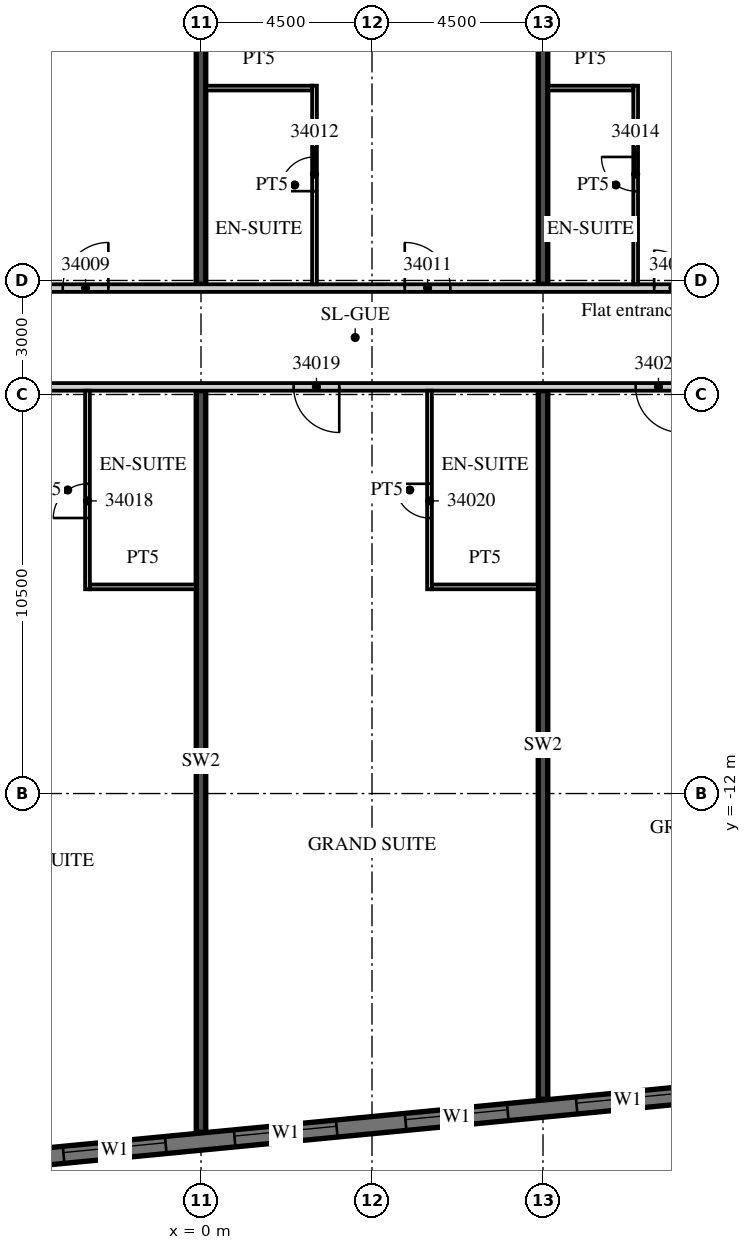
"""IFC4 building model, lengths in metres.
Left out: names, types, materials, properties, quantities, classifications, styles, units other than length and angle.
Written with IfcOpenShell. Run it as: python <this file> out.ifc"""

import sys

from ifc_helpers import new_model, si_unit, direction, frame, frame_2d, origin, place, context, subcontext, project, spatial, rectangle, extrude, element, fill, save


model = new_model("IFC4")
c1 = context("Model", 3, precision=1e-05, world=origin(), true_north=direction((0.0, 1.0)))
c2 = subcontext(c1, "Body", "Model", "MODEL_VIEW")
j1 = project(units=[si_unit("LENGTHUNIT", "METRE"), si_unit("PLANEANGLEUNIT", "RADIAN")], contexts=[c1])
p1 = place(None, origin())
s1 = spatial("IfcSite", under=j1, at=p1, CompositionType="ELEMENT")
p2 = place(p1, origin())
s2 = spatial("IfcBuilding", under=s1, at=p2, CompositionType="ELEMENT")
p3 = place(p2, frame((0.0, 0.0, 147.1)))
s3 = spatial("IfcBuildingStorey", under=s2, at=p3, CompositionType="ELEMENT", Elevation=147.1)
p4 = place(p3, frame((0.0, -20.91, 0.0), z_axis=(0.0, 0.0, 1.0), x_axis=(0.0, 1.0, 0.0)))
e1 = element("IfcWall", 1, at=p4, inside=s3, PredefinedType="SHEAR", context=c2, shape_type="SweptSolid", body=[
    extrude(rectangle(XDim=19.51, YDim=0.25, at=frame_2d((9.755, 0.0))), origin(), (0.0, 0.0, 1.0), 3.0),
])
p5 = place(p3, frame((0.0, 1.4, 0.0), z_axis=(0.0, 0.0, 1.0), x_axis=(0.0, 1.0, 0.0)))
e2 = element("IfcWall", 2, at=p5, inside=s3, PredefinedType="SHEAR", context=c2, shape_type="SweptSolid", body=[
    extrude(rectangle(XDim=19.94, YDim=0.25, at=frame_2d((9.97, 0.0))), origin(), (0.0, 0.0, 1.0), 3.0),
])
p6 = place(p3, frame((9.0, -20.044, 0.0), z_axis=(0.0, 0.0, 1.0), x_axis=(0.0, 1.0, 0.0)))
e3 = element("IfcWall", 3, at=p6, inside=s3, PredefinedType="SHEAR", context=c2, shape_type="SweptSolid", body=[
    extrude(rectangle(XDim=18.644, YDim=0.25, at=frame_2d((9.322, 0.0))), origin(), (0.0, 0.0, 1.0), 3.0),
])
p7 = place(p3, frame((9.0, 1.4, 0.0), z_axis=(0.0, 0.0, 1.0), x_axis=(0.0, 1.0, 0.0)))
e4 = element("IfcWall", 4, at=p7, inside=s3, PredefinedType="SHEAR", context=c2, shape_type="SweptSolid", body=[
    extrude(rectangle(XDim=20.807, YDim=0.25, at=frame_2d((10.403, 0.0))), origin(), (0.0, 0.0, 1.0), 3.0),
])
p8 = place(p3, frame((-13.521, -22.46, 0.0), z_axis=(0.0, 0.0, 1.0), x_axis=(0.995396096335, 0.095846812164, 0.0)))
e5 = element("IfcWall", 5, at=p8, inside=s3, PredefinedType="SOLIDWALL", context=c2, shape_type="SweptSolid", body=[
    extrude(rectangle(XDim=59.151, YDim=0.45, at=frame_2d((29.575, 0.0))), origin(), (0.0, 0.0, 1.0), 3.0),
])
p9 = place(p8, frame((0.91, 0.0, 0.45)))
e6 = element("IfcOpeningElement", 6, at=p9, cuts=e5, PredefinedType="OPENING", context=c2, shape_type="SweptSolid", body=[
    extrude(rectangle(XDim=2.7, YDim=2.25, at=frame_2d((1.35, 1.125))), frame((0.0, 0.235, 0.0), z_axis=(0.0, -1.0, 0.0), x_axis=(1.0, 0.0, 0.0)), (0.0, 0.0, 1.0), 0.47),
])
p10 = place(p8, frame((5.431, 0.0, 0.45)))
e7 = element("IfcOpeningElement", 7, at=p10, cuts=e5, PredefinedType="OPENING", context=c2, shape_type="SweptSolid", body=[
    extrude(rectangle(XDim=2.7, YDim=2.25, at=frame_2d((1.35, 1.125))), frame((0.0, 0.235, 0.0), z_axis=(0.0, -1.0, 0.0), x_axis=(1.0, 0.0, 0.0)), (0.0, 0.0, 1.0), 0.47),
])
p11 = place(p8, frame((9.952, 0.0, 0.45)))
e8 = element("IfcOpeningElement", 8, at=p11, cuts=e5, PredefinedType="OPENING", context=c2, shape_type="SweptSolid", body=[
    extrude(rectangle(XDim=2.7, YDim=2.25, at=frame_2d((1.35, 1.125))), frame((0.0, 0.235, 0.0), z_axis=(0.0, -1.0, 0.0), x_axis=(1.0, 0.0, 0.0)), (0.0, 0.0, 1.0), 0.47),
])
p12 = place(p8, frame((14.473, 0.0, 0.45)))
e9 = element("IfcOpeningElement", 9, at=p12, cuts=e5, PredefinedType="OPENING", context=c2, shape_type="SweptSolid", body=[
    extrude(rectangle(XDim=2.7, YDim=2.25, at=frame_2d((1.35, 1.125))), frame((0.0, 0.235, 0.0), z_axis=(0.0, -1.0, 0.0), x_axis=(1.0, 0.0, 0.0)), (0.0, 0.0, 1.0), 0.47),
])
p13 = place(p8, frame((18.994, 0.0, 0.45)))
e10 = element("IfcOpeningElement", 10, at=p13, cuts=e5, PredefinedType="OPENING", context=c2, shape_type="SweptSolid", body=[
    extrude(rectangle(XDim=2.7, YDim=2.25, at=frame_2d((1.35, 1.125))), frame((0.0, 0.235, 0.0), z_axis=(0.0, -1.0, 0.0), x_axis=(1.0, 0.0, 0.0)), (0.0, 0.0, 1.0), 0.47),
])
p14 = place(p8, frame((23.514, 0.0, 0.45)))
e11 = element("IfcOpeningElement", 11, at=p14, cuts=e5, PredefinedType="OPENING", context=c2, shape_type="SweptSolid", body=[
    extrude(rectangle(XDim=2.7, YDim=2.25, at=frame_2d((1.35, 1.125))), frame((0.0, 0.235, 0.0), z_axis=(0.0, -1.0, 0.0), x_axis=(1.0, 0.0, 0.0)), (0.0, 0.0, 1.0), 0.47),
])
p15 = place(p8, frame((28.035, 0.0, 0.45)))
e12 = element("IfcOpeningElement", 12, at=p15, cuts=e5, PredefinedType="OPENING", context=c2, shape_type="SweptSolid", body=[
    extrude(rectangle(XDim=2.7, YDim=2.25, at=frame_2d((1.35, 1.125))), frame((0.0, 0.235, 0.0), z_axis=(0.0, -1.0, 0.0), x_axis=(1.0, 0.0, 0.0)), (0.0, 0.0, 1.0), 0.47),
])
p16 = place(p8, frame((32.556, 0.0, 0.45)))
e13 = element("IfcOpeningElement", 13, at=p16, cuts=e5, PredefinedType="OPENING", context=c2, shape_type="SweptSolid", body=[
    extrude(rectangle(XDim=2.7, YDim=2.25, at=frame_2d((1.35, 1.125))), frame((0.0, 0.235, 0.0), z_axis=(0.0, -1.0, 0.0), x_axis=(1.0, 0.0, 0.0)), (0.0, 0.0, 1.0), 0.47),
])
p17 = place(p8, frame((37.077, 0.0, 0.45)))
e14 = element("IfcOpeningElement", 14, at=p17, cuts=e5, PredefinedType="OPENING", context=c2, shape_type="SweptSolid", body=[
    extrude(rectangle(XDim=2.7, YDim=2.25, at=frame_2d((1.35, 1.125))), frame((0.0, 0.235, 0.0), z_axis=(0.0, -1.0, 0.0), x_axis=(1.0, 0.0, 0.0)), (0.0, 0.0, 1.0), 0.47),
])
p18 = place(p8, frame((41.598, 0.0, 0.45)))
e15 = element("IfcOpeningElement", 15, at=p18, cuts=e5, PredefinedType="OPENING", context=c2, shape_type="SweptSolid", body=[
    extrude(rectangle(XDim=2.7, YDim=2.25, at=frame_2d((1.35, 1.125))), frame((0.0, 0.235, 0.0), z_axis=(0.0, -1.0, 0.0), x_axis=(1.0, 0.0, 0.0)), (0.0, 0.0, 1.0), 0.47),
])
p19 = place(p8, frame((46.118, 0.0, 0.45)))
e16 = element("IfcOpeningElement", 16, at=p19, cuts=e5, PredefinedType="OPENING", context=c2, shape_type="SweptSolid", body=[
    extrude(rectangle(XDim=2.7, YDim=2.25, at=frame_2d((1.35, 1.125))), frame((0.0, 0.235, 0.0), z_axis=(0.0, -1.0, 0.0), x_axis=(1.0, 0.0, 0.0)), (0.0, 0.0, 1.0), 0.47),
])
p20 = place(p8, frame((50.639, 0.0, 0.45)))
e17 = element("IfcOpeningElement", 17, at=p20, cuts=e5, PredefinedType="OPENING", context=c2, shape_type="SweptSolid", body=[
    extrude(rectangle(XDim=2.7, YDim=2.25, at=frame_2d((1.35, 1.125))), frame((0.0, 0.235, 0.0), z_axis=(0.0, -1.0, 0.0), x_axis=(1.0, 0.0, 0.0)), (0.0, 0.0, 1.0), 0.47),
])
p21 = place(p8, frame((55.15, 0.0, 0.45)))
e18 = element("IfcOpeningElement", 18, at=p21, cuts=e5, PredefinedType="OPENING", context=c2, shape_type="SweptSolid", body=[
    extrude(rectangle(XDim=2.7, YDim=2.25, at=frame_2d((1.35, 1.125))), frame((0.0, 0.235, 0.0), z_axis=(0.0, -1.0, 0.0), x_axis=(1.0, 0.0, 0.0)), (0.0, 0.0, 1.0), 0.47),
])
p22 = place(p3, frame((-39.316, 1.3, 0.0), z_axis=(0.0, 0.0, 1.0), x_axis=(1.0, 0.0, 0.0)))
e19 = element("IfcWall", 19, at=p22, inside=s3, PredefinedType="PARTITIONING", context=c2, shape_type="SweptSolid", body=[
    extrude(rectangle(XDim=52.816, YDim=0.2, at=frame_2d((26.408, 0.0))), origin(), (0.0, 0.0, 1.0), 3.0),
])
p23 = place(p22, frame((0.15, 0.0, 0.0)))
e20 = element("IfcOpeningElement", 20, at=p23, cuts=e19, PredefinedType="OPENING", context=c2, shape_type="SweptSolid", body=[
    extrude(rectangle(XDim=0.9, YDim=2.1, at=frame_2d((0.45, 1.05))), frame((0.0, 0.11, 0.0), z_axis=(0.0, -1.0, 0.0), x_axis=(1.0, 0.0, 0.0)), (0.0, 0.0, 1.0), 0.22),
])
p24 = place(p22, frame((5.754, 0.0, 0.0)))
e21 = element("IfcOpeningElement", 21, at=p24, cuts=e19, PredefinedType="OPENING", context=c2, shape_type="SweptSolid", body=[
    extrude(rectangle(XDim=1.2, YDim=2.1, at=frame_2d((0.6, 1.05))), frame((0.0, 0.11, 0.0), z_axis=(0.0, -1.0, 0.0), x_axis=(1.0, 0.0, 0.0)), (0.0, 0.0, 1.0), 0.22),
])
p25 = place(p22, frame((14.754, 0.0, 0.0)))
e22 = element("IfcOpeningElement", 22, at=p25, cuts=e19, PredefinedType="OPENING", context=c2, shape_type="SweptSolid", body=[
    extrude(rectangle(XDim=1.2, YDim=2.1, at=frame_2d((0.6, 1.05))), frame((0.0, 0.11, 0.0), z_axis=(0.0, -1.0, 0.0), x_axis=(1.0, 0.0, 0.0)), (0.0, 0.0, 1.0), 0.22),
])
p26 = place(p22, frame((23.754, 0.0, 0.0)))
e23 = element("IfcOpeningElement", 23, at=p26, cuts=e19, PredefinedType="OPENING", context=c2, shape_type="SweptSolid", body=[
    extrude(rectangle(XDim=1.2, YDim=2.1, at=frame_2d((0.6, 1.05))), frame((0.0, 0.11, 0.0), z_axis=(0.0, -1.0, 0.0), x_axis=(1.0, 0.0, 0.0)), (0.0, 0.0, 1.0), 0.22),
])
p27 = place(p22, frame((35.678, 0.0, 0.0)))
e24 = element("IfcOpeningElement", 24, at=p27, cuts=e19, PredefinedType="OPENING", context=c2, shape_type="SweptSolid", body=[
    extrude(rectangle(XDim=1.2, YDim=2.1, at=frame_2d((0.6, 1.05))), frame((0.0, 0.11, 0.0), z_axis=(0.0, -1.0, 0.0), x_axis=(1.0, 0.0, 0.0)), (0.0, 0.0, 1.0), 0.22),
])
p28 = place(p22, frame((44.678, 0.0, 0.0)))
e25 = element("IfcOpeningElement", 25, at=p28, cuts=e19, PredefinedType="OPENING", context=c2, shape_type="SweptSolid", body=[
    extrude(rectangle(XDim=1.2, YDim=2.1, at=frame_2d((0.6, 1.05))), frame((0.0, 0.11, 0.0), z_axis=(0.0, -1.0, 0.0), x_axis=(1.0, 0.0, 0.0)), (0.0, 0.0, 1.0), 0.22),
])
p29 = place(p22, frame((51.241, 0.0, 0.0)))
e26 = element("IfcOpeningElement", 26, at=p29, cuts=e19, PredefinedType="OPENING", context=c2, shape_type="SweptSolid", body=[
    extrude(rectangle(XDim=1.0, YDim=2.1, at=frame_2d((0.5, 1.05))), frame((0.0, 0.11, 0.0), z_axis=(0.0, -1.0, 0.0), x_axis=(1.0, 0.0, 0.0)), (0.0, 0.0, 1.0), 0.22),
])
p30 = place(p3, frame((2.987, 1.4, 0.0), z_axis=(0.0, 0.0, 1.0), x_axis=(0.0, 1.0, 0.0)))
e27 = element("IfcWall", 27, at=p30, inside=s3, PredefinedType="PARTITIONING", context=c2, shape_type="SweptSolid", body=[
    extrude(rectangle(XDim=5.225, YDim=0.125, at=frame_2d((2.613, 0.0))), origin(), (0.0, 0.0, 1.0), 3.0),
])
p31 = place(p30, frame((2.45, 0.0, 0.0)))
e28 = element("IfcOpeningElement", 28, at=p31, cuts=e27, PredefinedType="OPENING", context=c2, shape_type="SweptSolid", body=[
    extrude(rectangle(XDim=0.9, YDim=2.1, at=frame_2d((0.45, 1.05))), frame((0.0, 0.073, 0.0), z_axis=(0.0, -1.0, 0.0), x_axis=(1.0, 0.0, 0.0)), (0.0, 0.0, 1.0), 0.145),
])
p32 = place(p3, frame((0.125, 6.562, 0.0), z_axis=(0.0, 0.0, 1.0), x_axis=(1.0, 0.0, 0.0)))
e29 = element("IfcWall", 29, at=p32, inside=s3, PredefinedType="PARTITIONING", context=c2, shape_type="SweptSolid", body=[
    extrude(rectangle(XDim=2.8, YDim=0.125, at=frame_2d((1.4, 0.0))), origin(), (0.0, 0.0, 1.0), 3.0),
])
p33 = place(p3, frame((11.438, 1.4, 0.0), z_axis=(0.0, 0.0, 1.0), x_axis=(0.0, 1.0, 0.0)))
e30 = element("IfcWall", 30, at=p33, inside=s3, PredefinedType="PARTITIONING", context=c2, shape_type="SweptSolid", body=[
    extrude(rectangle(XDim=5.225, YDim=0.125, at=frame_2d((2.613, 0.0))), origin(), (0.0, 0.0, 1.0), 3.0),
])
p34 = place(p33, frame((2.45, 0.0, 0.0)))
e31 = element("IfcOpeningElement", 31, at=p34, cuts=e30, PredefinedType="OPENING", context=c2, shape_type="SweptSolid", body=[
    extrude(rectangle(XDim=0.9, YDim=2.1, at=frame_2d((0.45, 1.05))), frame((0.0, 0.073, 0.0), z_axis=(0.0, -1.0, 0.0), x_axis=(1.0, 0.0, 0.0)), (0.0, 0.0, 1.0), 0.145),
])
p35 = place(p3, frame((9.125, 6.562, 0.0), z_axis=(0.0, 0.0, 1.0), x_axis=(1.0, 0.0, 0.0)))
e32 = element("IfcWall", 32, at=p35, inside=s3, PredefinedType="PARTITIONING", context=c2, shape_type="SweptSolid", body=[
    extrude(rectangle(XDim=2.25, YDim=0.125, at=frame_2d((1.125, 0.0))), origin(), (0.0, 0.0, 1.0), 3.0),
])
p36 = place(p3, frame((-13.5, -1.3, 0.0), z_axis=(0.0, 0.0, 1.0), x_axis=(1.0, 0.0, 0.0)))
e33 = element("IfcWall", 33, at=p36, inside=s3, PredefinedType="PARTITIONING", context=c2, shape_type="SweptSolid", body=[
    extrude(rectangle(XDim=60.932, YDim=0.2, at=frame_2d((30.466, 0.0))), origin(), (0.0, 0.0, 1.0), 3.0),
])
p37 = place(p36, frame((2.925, 0.0, 0.0)))
e34 = element("IfcOpeningElement", 34, at=p37, cuts=e33, PredefinedType="OPENING", context=c2, shape_type="SweptSolid", body=[
    extrude(rectangle(XDim=1.0, YDim=2.1, at=frame_2d((0.5, 1.05))), frame((0.0, 0.11, 0.0), z_axis=(0.0, -1.0, 0.0), x_axis=(1.0, 0.0, 0.0)), (0.0, 0.0, 1.0), 0.22),
])
p38 = place(p36, frame((6.938, 0.0, 0.0)))
e35 = element("IfcOpeningElement", 35, at=p38, cuts=e33, PredefinedType="OPENING", context=c2, shape_type="SweptSolid", body=[
    extrude(rectangle(XDim=1.2, YDim=2.1, at=frame_2d((0.6, 1.05))), frame((0.0, 0.11, 0.0), z_axis=(0.0, -1.0, 0.0), x_axis=(1.0, 0.0, 0.0)), (0.0, 0.0, 1.0), 0.22),
])
p39 = place(p36, frame((15.938, 0.0, 0.0)))
e36 = element("IfcOpeningElement", 36, at=p39, cuts=e33, PredefinedType="OPENING", context=c2, shape_type="SweptSolid", body=[
    extrude(rectangle(XDim=1.2, YDim=2.1, at=frame_2d((0.6, 1.05))), frame((0.0, 0.11, 0.0), z_axis=(0.0, -1.0, 0.0), x_axis=(1.0, 0.0, 0.0)), (0.0, 0.0, 1.0), 0.22),
])
p40 = place(p36, frame((24.938, 0.0, 0.0)))
e37 = element("IfcOpeningElement", 37, at=p40, cuts=e33, PredefinedType="OPENING", context=c2, shape_type="SweptSolid", body=[
    extrude(rectangle(XDim=1.2, YDim=2.1, at=frame_2d((0.6, 1.05))), frame((0.0, 0.11, 0.0), z_axis=(0.0, -1.0, 0.0), x_axis=(1.0, 0.0, 0.0)), (0.0, 0.0, 1.0), 0.22),
])
p41 = place(p36, frame((32.075, 0.0, 0.0)))
e38 = element("IfcOpeningElement", 38, at=p41, cuts=e33, PredefinedType="OPENING", context=c2, shape_type="SweptSolid", body=[
    extrude(rectangle(XDim=1.0, YDim=2.1, at=frame_2d((0.5, 1.05))), frame((0.0, 0.11, 0.0), z_axis=(0.0, -1.0, 0.0), x_axis=(1.0, 0.0, 0.0)), (0.0, 0.0, 1.0), 0.22),
])
p42 = place(p36, frame((36.55, 0.0, 0.0)))
e39 = element("IfcOpeningElement", 39, at=p42, cuts=e33, PredefinedType="OPENING", context=c2, shape_type="SweptSolid", body=[
    extrude(rectangle(XDim=1.0, YDim=2.1, at=frame_2d((0.5, 1.05))), frame((0.0, 0.11, 0.0), z_axis=(0.0, -1.0, 0.0), x_axis=(1.0, 0.0, 0.0)), (0.0, 0.0, 1.0), 0.22),
])
p43 = place(p36, frame((42.938, 0.0, 0.0)))
e40 = element("IfcOpeningElement", 40, at=p43, cuts=e33, PredefinedType="OPENING", context=c2, shape_type="SweptSolid", body=[
    extrude(rectangle(XDim=1.2, YDim=2.1, at=frame_2d((0.6, 1.05))), frame((0.0, 0.11, 0.0), z_axis=(0.0, -1.0, 0.0), x_axis=(1.0, 0.0, 0.0)), (0.0, 0.0, 1.0), 0.22),
])
p44 = place(p36, frame((52.425, 0.0, 0.0)))
e41 = element("IfcOpeningElement", 41, at=p44, cuts=e33, PredefinedType="OPENING", context=c2, shape_type="SweptSolid", body=[
    extrude(rectangle(XDim=1.0, YDim=2.1, at=frame_2d((0.5, 1.05))), frame((0.0, 0.11, 0.0), z_axis=(0.0, -1.0, 0.0), x_axis=(1.0, 0.0, 0.0)), (0.0, 0.0, 1.0), 0.22),
])
p45 = place(p36, frame((58.316, 0.0, 0.0)))
e42 = element("IfcOpeningElement", 42, at=p45, cuts=e33, PredefinedType="OPENING", context=c2, shape_type="SweptSolid", body=[
    extrude(rectangle(XDim=1.2, YDim=2.1, at=frame_2d((0.6, 1.05))), frame((0.0, 0.11, 0.0), z_axis=(0.0, -1.0, 0.0), x_axis=(1.0, 0.0, 0.0)), (0.0, 0.0, 1.0), 0.22),
])
p46 = place(p3, frame((-2.987, -6.625, 0.0), z_axis=(0.0, 0.0, 1.0), x_axis=(0.0, 1.0, 0.0)))
e43 = element("IfcWall", 43, at=p46, inside=s3, PredefinedType="PARTITIONING", context=c2, shape_type="SweptSolid", body=[
    extrude(rectangle(XDim=5.225, YDim=0.125, at=frame_2d((2.613, 0.0))), origin(), (0.0, 0.0, 1.0), 3.0),
])
p47 = place(p46, frame((1.875, 0.0, 0.0)))
e44 = element("IfcOpeningElement", 44, at=p47, cuts=e43, PredefinedType="OPENING", context=c2, shape_type="SweptSolid", body=[
    extrude(rectangle(XDim=0.9, YDim=2.1, at=frame_2d((0.45, 1.05))), frame((0.0, 0.073, 0.0), z_axis=(0.0, -1.0, 0.0), x_axis=(1.0, 0.0, 0.0)), (0.0, 0.0, 1.0), 0.145),
])
p48 = place(p3, frame((-2.925, -6.562, 0.0), z_axis=(0.0, 0.0, 1.0), x_axis=(1.0, 0.0, 0.0)))
e45 = element("IfcWall", 45, at=p48, inside=s3, PredefinedType="PARTITIONING", context=c2, shape_type="SweptSolid", body=[
    extrude(rectangle(XDim=2.8, YDim=0.125, at=frame_2d((1.4, 0.0))), origin(), (0.0, 0.0, 1.0), 3.0),
])
p49 = place(p3, frame((6.013, -6.625, 0.0), z_axis=(0.0, 0.0, 1.0), x_axis=(0.0, 1.0, 0.0)))
e46 = element("IfcWall", 46, at=p49, inside=s3, PredefinedType="PARTITIONING", context=c2, shape_type="SweptSolid", body=[
    extrude(rectangle(XDim=5.225, YDim=0.125, at=frame_2d((2.613, 0.0))), origin(), (0.0, 0.0, 1.0), 3.0),
])
p50 = place(p49, frame((1.875, 0.0, 0.0)))
e47 = element("IfcOpeningElement", 47, at=p50, cuts=e46, PredefinedType="OPENING", context=c2, shape_type="SweptSolid", body=[
    extrude(rectangle(XDim=0.9, YDim=2.1, at=frame_2d((0.45, 1.05))), frame((0.0, 0.073, 0.0), z_axis=(0.0, -1.0, 0.0), x_axis=(1.0, 0.0, 0.0)), (0.0, 0.0, 1.0), 0.145),
])
p51 = place(p3, frame((6.075, -6.562, 0.0), z_axis=(0.0, 0.0, 1.0), x_axis=(1.0, 0.0, 0.0)))
e48 = element("IfcWall", 48, at=p51, inside=s3, PredefinedType="PARTITIONING", context=c2, shape_type="SweptSolid", body=[
    extrude(rectangle(XDim=2.8, YDim=0.125, at=frame_2d((1.4, 0.0))), origin(), (0.0, 0.0, 1.0), 3.0),
])
p52 = place(p11, origin())
e49 = element("IfcWindow", 49, at=p52, inside=s3, PartitioningType="SINGLE_PANEL", PredefinedType="WINDOW", context=c2, shape_type="SweptSolid", body=[
    extrude(rectangle(XDim=2.7, YDim=2.25, at=frame_2d((1.35, 1.125))), frame((0.0, 0.09, 0.0), z_axis=(0.0, -1.0, 0.0), x_axis=(1.0, 0.0, 0.0)), (0.0, 0.0, 1.0), 0.06),
])
fill(e8, e49)
p53 = place(p12, origin())
e50 = element("IfcWindow", 50, at=p53, inside=s3, PartitioningType="SINGLE_PANEL", PredefinedType="WINDOW", context=c2, shape_type="SweptSolid", body=[
    extrude(rectangle(XDim=2.7, YDim=2.25, at=frame_2d((1.35, 1.125))), frame((0.0, 0.09, 0.0), z_axis=(0.0, -1.0, 0.0), x_axis=(1.0, 0.0, 0.0)), (0.0, 0.0, 1.0), 0.06),
])
fill(e9, e50)
p54 = place(p13, origin())
e51 = element("IfcWindow", 51, at=p54, inside=s3, PartitioningType="SINGLE_PANEL", PredefinedType="WINDOW", context=c2, shape_type="SweptSolid", body=[
    extrude(rectangle(XDim=2.7, YDim=2.25, at=frame_2d((1.35, 1.125))), frame((0.0, 0.09, 0.0), z_axis=(0.0, -1.0, 0.0), x_axis=(1.0, 0.0, 0.0)), (0.0, 0.0, 1.0), 0.06),
])
fill(e10, e51)
p55 = place(p14, origin())
e52 = element("IfcWindow", 52, at=p55, inside=s3, PartitioningType="SINGLE_PANEL", PredefinedType="WINDOW", context=c2, shape_type="SweptSolid", body=[
    extrude(rectangle(XDim=2.7, YDim=2.25, at=frame_2d((1.35, 1.125))), frame((0.0, 0.09, 0.0), z_axis=(0.0, -1.0, 0.0), x_axis=(1.0, 0.0, 0.0)), (0.0, 0.0, 1.0), 0.06),
])
fill(e11, e52)
p56 = place(p27, origin())
e53 = element("IfcDoor", 53, at=p56, inside=s3, OperationType="SINGLE_SWING_RIGHT", PredefinedType="DOOR", context=c2, shape_type="SweptSolid", body=[
    extrude(rectangle(XDim=1.2, YDim=2.1, at=frame_2d((0.6, 1.05))), frame((0.0, 0.025, 0.0), z_axis=(0.0, -1.0, 0.0), x_axis=(1.0, 0.0, 0.0)), (0.0, 0.0, 1.0), 0.05),
])
fill(e24, e53)
p57 = place(p28, origin())
e54 = element("IfcDoor", 54, at=p57, inside=s3, OperationType="SINGLE_SWING_LEFT", PredefinedType="DOOR", context=c2, shape_type="SweptSolid", body=[
    extrude(rectangle(XDim=1.2, YDim=2.1, at=frame_2d((0.6, 1.05))), frame((0.0, 0.025, 0.0), z_axis=(0.0, -1.0, 0.0), x_axis=(1.0, 0.0, 0.0)), (0.0, 0.0, 1.0), 0.05),
])
fill(e25, e54)
p58 = place(p31, origin())
e55 = element("IfcDoor", 55, at=p58, inside=s3, OperationType="SINGLE_SWING_LEFT", PredefinedType="DOOR", context=c2, shape_type="SweptSolid", body=[
    extrude(rectangle(XDim=0.9, YDim=2.1, at=frame_2d((0.45, 1.05))), frame((0.0, 0.025, 0.0), z_axis=(0.0, -1.0, 0.0), x_axis=(1.0, 0.0, 0.0)), (0.0, 0.0, 1.0), 0.05),
])
fill(e28, e55)
p59 = place(p29, origin())
e56 = element("IfcDoor", 56, at=p59, inside=s3, OperationType="SINGLE_SWING_LEFT", PredefinedType="DOOR", context=c2, shape_type="SweptSolid", body=[
    extrude(rectangle(XDim=1.0, YDim=2.1, at=frame_2d((0.5, 1.05))), frame((0.0, 0.025, 0.0), z_axis=(0.0, -1.0, 0.0), x_axis=(1.0, 0.0, 0.0)), (0.0, 0.0, 1.0), 0.05),
])
fill(e26, e56)
p60 = place(p34, origin())
e57 = element("IfcDoor", 57, at=p60, inside=s3, OperationType="SINGLE_SWING_RIGHT", PredefinedType="DOOR", context=c2, shape_type="SweptSolid", body=[
    extrude(rectangle(XDim=0.9, YDim=2.1, at=frame_2d((0.45, 1.05))), frame((0.0, 0.025, 0.0), z_axis=(0.0, -1.0, 0.0), x_axis=(1.0, 0.0, 0.0)), (0.0, 0.0, 1.0), 0.05),
])
fill(e31, e57)
p61 = place(p47, origin())
e58 = element("IfcDoor", 58, at=p61, inside=s3, OperationType="SINGLE_SWING_LEFT", PredefinedType="DOOR", context=c2, shape_type="SweptSolid", body=[
    extrude(rectangle(XDim=0.9, YDim=2.1, at=frame_2d((0.45, 1.05))), frame((0.0, 0.025, 0.0), z_axis=(0.0, -1.0, 0.0), x_axis=(1.0, 0.0, 0.0)), (0.0, 0.0, 1.0), 0.05),
])
fill(e44, e58)
p62 = place(p39, origin())
e59 = element("IfcDoor", 59, at=p62, inside=s3, OperationType="SINGLE_SWING_RIGHT", PredefinedType="DOOR", context=c2, shape_type="SweptSolid", body=[
    extrude(rectangle(XDim=1.2, YDim=2.1, at=frame_2d((0.6, 1.05))), frame((0.0, 0.025, 0.0), z_axis=(0.0, -1.0, 0.0), x_axis=(1.0, 0.0, 0.0)), (0.0, 0.0, 1.0), 0.05),
])
fill(e36, e59)
p63 = place(p50, origin())
e60 = element("IfcDoor", 60, at=p63, inside=s3, OperationType="SINGLE_SWING_RIGHT", PredefinedType="DOOR", context=c2, shape_type="SweptSolid", body=[
    extrude(rectangle(XDim=0.9, YDim=2.1, at=frame_2d((0.45, 1.05))), frame((0.0, 0.025, 0.0), z_axis=(0.0, -1.0, 0.0), x_axis=(1.0, 0.0, 0.0)), (0.0, 0.0, 1.0), 0.05),
])
fill(e47, e60)
p64 = place(p40, origin())
e61 = element("IfcDoor", 61, at=p64, inside=s3, OperationType="SINGLE_SWING_RIGHT", PredefinedType="DOOR", context=c2, shape_type="SweptSolid", body=[
    extrude(rectangle(XDim=1.2, YDim=2.1, at=frame_2d((0.6, 1.05))), frame((0.0, 0.025, 0.0), z_axis=(0.0, -1.0, 0.0), x_axis=(1.0, 0.0, 0.0)), (0.0, 0.0, 1.0), 0.05),
])
fill(e37, e61)
save(model, sys.argv[1])
